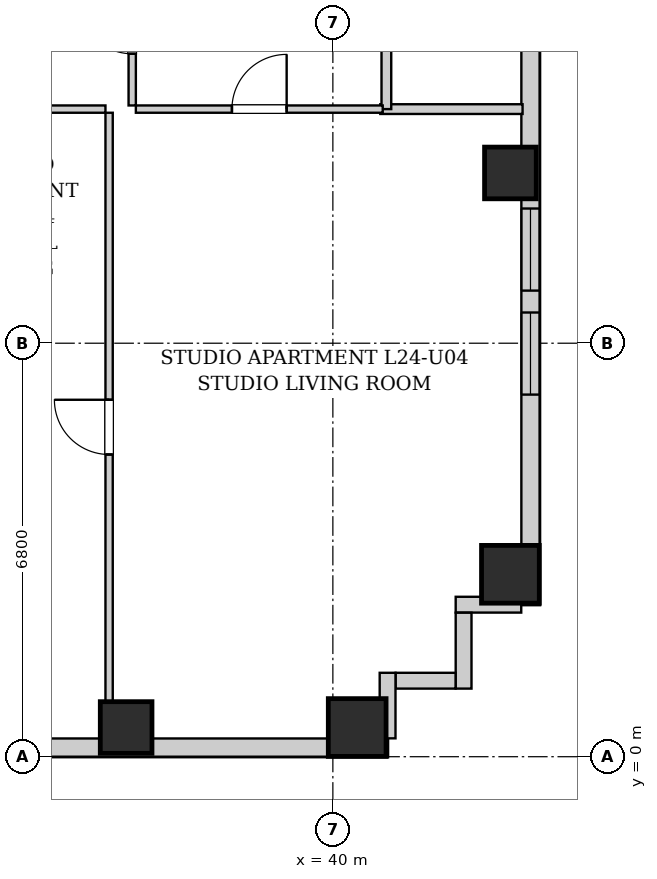
"""IFC4 building model, lengths in metres.
Left out: names, types, materials, properties, quantities, classifications, styles, units other than length and angle.
Written with IfcOpenShell. Run it as: python <this file> out.ifc"""

import sys

from ifc_helpers import new_model, si_unit, direction, frame, frame_2d, origin, origin_2d, place, context, subcontext, project, spatial, rectangle, extrude, element, fill, save


model = new_model("IFC4")
c1 = context("Model", 3, precision=1e-05, world=origin(), true_north=direction((0.0, 1.0)))
c2 = subcontext(c1, "Body", "Model", "MODEL_VIEW")
j1 = project(units=[si_unit("LENGTHUNIT", "METRE"), si_unit("PLANEANGLEUNIT", "RADIAN")], contexts=[c1])
p1 = place(None, origin())
s1 = spatial("IfcSite", under=j1, at=p1, CompositionType="ELEMENT")
p2 = place(p1, origin())
s2 = spatial("IfcBuilding", under=s1, at=p2, CompositionType="ELEMENT")
p3 = place(p2, frame((0.0, 0.0, 87.9)))
s3 = spatial("IfcBuildingStorey", under=s2, at=p3, CompositionType="ELEMENT", Elevation=87.9)
p4 = place(p3, frame((36.6, 0.48, 0.0), z_axis=(0.0, 0.0, 1.0), x_axis=(1.0, 0.0, 0.0)))
e1 = element("IfcColumn", 1, at=p4, inside=s3, PredefinedType="COLUMN", context=c2, shape_type="SweptSolid", body=[
    extrude(rectangle(XDim=0.85, YDim=0.85, at=origin_2d()), origin(), (0.0, 0.0, 1.0), 3.2),
])
for number, where, z_axis, x_axis in (
    (2, (40.4, 0.48, 0.0), (0.0, 0.0, 1.0), (1.0, 0.0, 0.0)),
    (3, (42.92, 3.0, 0.0), (0.0, 0.0, 1.0), (1.0, 0.0, 0.0)),
):
    element("IfcColumn", number, at=place(p3, frame(where, z_axis=z_axis, x_axis=x_axis)), inside=s3, PredefinedType="COLUMN", context=c2, shape_type="SweptSolid", body=[
        extrude(rectangle(XDim=0.95, YDim=0.95, at=origin_2d()), origin(), (0.0, 0.0, 1.0), 3.2),
    ])
p5 = place(p3, frame((42.92, 9.6, 0.0), z_axis=(0.0, 0.0, 1.0), x_axis=(1.0, 0.0, 0.0)))
e4 = element("IfcColumn", 4, at=p5, inside=s3, PredefinedType="COLUMN", context=c2, shape_type="SweptSolid", body=[
    extrude(rectangle(XDim=0.85, YDim=0.85, at=origin_2d()), origin(), (0.0, 0.0, 1.0), 3.2),
])
p6 = place(p3, frame((43.25, 40.8, 0.0), z_axis=(0.0, 0.0, 1.0), x_axis=(0.0, -1.0, 0.0)))
e5 = element("IfcWall", 5, at=p6, inside=s3, PredefinedType="SOLIDWALL", context=c2, shape_type="SweptSolid", body=[
    extrude(rectangle(XDim=38.3, YDim=0.3, at=frame_2d((19.15, 0.0))), origin(), (0.0, 0.0, 1.0), 2.94),
])
p7 = place(p6, frame((33.495, 0.0, 0.55)))
e6 = element("IfcOpeningElement", 6, at=p7, cuts=e5, PredefinedType="OPENING", context=c2, shape_type="SweptSolid", body=[
    extrude(rectangle(XDim=1.35, YDim=1.2, at=frame_2d((0.675, 0.6))), frame((0.0, 0.16, 0.0), z_axis=(0.0, -1.0, 0.0), x_axis=(1.0, 0.0, 0.0)), (0.0, 0.0, 1.0), 0.32),
])
p8 = place(p6, frame((31.785, 0.0, 0.55)))
e7 = element("IfcOpeningElement", 7, at=p8, cuts=e5, PredefinedType="OPENING", context=c2, shape_type="SweptSolid", body=[
    extrude(rectangle(XDim=1.35, YDim=1.2, at=frame_2d((0.675, 0.6))), frame((0.0, 0.16, 0.0), z_axis=(0.0, -1.0, 0.0), x_axis=(1.0, 0.0, 0.0)), (0.0, 0.0, 1.0), 0.32),
])
p9 = place(p6, frame((3.08, 0.0, 0.55)))
e8 = element("IfcOpeningElement", 8, at=p9, cuts=e5, PredefinedType="OPENING", context=c2, shape_type="SweptSolid", body=[
    extrude(rectangle(XDim=1.35, YDim=1.2, at=frame_2d((0.675, 0.6))), frame((0.0, 0.16, 0.0), z_axis=(0.0, -1.0, 0.0), x_axis=(1.0, 0.0, 0.0)), (0.0, 0.0, 1.0), 0.32),
])
p10 = place(p6, frame((1.135, 0.0, 0.55)))
e9 = element("IfcOpeningElement", 9, at=p10, cuts=e5, PredefinedType="OPENING", context=c2, shape_type="SweptSolid", body=[
    extrude(rectangle(XDim=1.35, YDim=1.2, at=frame_2d((0.675, 0.6))), frame((0.0, 0.16, 0.0), z_axis=(0.0, -1.0, 0.0), x_axis=(1.0, 0.0, 0.0)), (0.0, 0.0, 1.0), 0.32),
])
p11 = place(p6, frame((21.93, 0.0, 0.55)))
e10 = element("IfcOpeningElement", 10, at=p11, cuts=e5, PredefinedType="OPENING", context=c2, shape_type="SweptSolid", body=[
    extrude(rectangle(XDim=1.35, YDim=1.2, at=frame_2d((0.675, 0.6))), frame((0.0, 0.16, 0.0), z_axis=(0.0, -1.0, 0.0), x_axis=(1.0, 0.0, 0.0)), (0.0, 0.0, 1.0), 0.32),
])
p12 = place(p6, frame((23.54, 0.0, 0.55)))
e11 = element("IfcOpeningElement", 11, at=p12, cuts=e5, PredefinedType="OPENING", context=c2, shape_type="SweptSolid", body=[
    extrude(rectangle(XDim=1.35, YDim=1.2, at=frame_2d((0.675, 0.6))), frame((0.0, 0.16, 0.0), z_axis=(0.0, -1.0, 0.0), x_axis=(1.0, 0.0, 0.0)), (0.0, 0.0, 1.0), 0.32),
])
p13 = place(p6, frame((14.95, 0.0, 0.55)))
e12 = element("IfcOpeningElement", 12, at=p13, cuts=e5, PredefinedType="OPENING", context=c2, shape_type="SweptSolid", body=[
    extrude(rectangle(XDim=1.35, YDim=1.2, at=frame_2d((0.675, 0.6))), frame((0.0, 0.16, 0.0), z_axis=(0.0, -1.0, 0.0), x_axis=(1.0, 0.0, 0.0)), (0.0, 0.0, 1.0), 0.32),
])
p14 = place(p6, frame((12.385, 0.0, 0.55)))
e13 = element("IfcOpeningElement", 13, at=p14, cuts=e5, PredefinedType="OPENING", context=c2, shape_type="SweptSolid", body=[
    extrude(rectangle(XDim=1.35, YDim=1.2, at=frame_2d((0.675, 0.6))), frame((0.0, 0.16, 0.0), z_axis=(0.0, -1.0, 0.0), x_axis=(1.0, 0.0, 0.0)), (0.0, 0.0, 1.0), 0.32),
])
p15 = place(p3, frame((40.9, 0.15, 0.0), z_axis=(0.0, 0.0, 1.0), x_axis=(-1.0, 0.0, 0.0)))
e14 = element("IfcWall", 14, at=p15, inside=s3, PredefinedType="SOLIDWALL", context=c2, shape_type="SweptSolid", body=[
    extrude(rectangle(XDim=23.9, YDim=0.3, at=frame_2d((11.95, 0.0))), origin(), (0.0, 0.0, 1.0), 2.94),
])
p16 = place(p15, frame((21.045, 0.0, 0.55)))
e15 = element("IfcOpeningElement", 15, at=p16, cuts=e14, PredefinedType="OPENING", context=c2, shape_type="SweptSolid", body=[
    extrude(rectangle(XDim=1.35, YDim=1.2, at=frame_2d((0.675, 0.6))), frame((0.0, 0.16, 0.0), z_axis=(0.0, -1.0, 0.0), x_axis=(1.0, 0.0, 0.0)), (0.0, 0.0, 1.0), 0.32),
])
p17 = place(p15, frame((18.4, 0.0, 0.55)))
e16 = element("IfcOpeningElement", 16, at=p17, cuts=e14, PredefinedType="OPENING", context=c2, shape_type="SweptSolid", body=[
    extrude(rectangle(XDim=1.35, YDim=1.2, at=frame_2d((0.675, 0.6))), frame((0.0, 0.16, 0.0), z_axis=(0.0, -1.0, 0.0), x_axis=(1.0, 0.0, 0.0)), (0.0, 0.0, 1.0), 0.32),
])
p18 = place(p15, frame((12.05, 0.0, 0.55)))
e17 = element("IfcOpeningElement", 17, at=p18, cuts=e14, PredefinedType="OPENING", context=c2, shape_type="SweptSolid", body=[
    extrude(rectangle(XDim=1.35, YDim=1.2, at=frame_2d((0.675, 0.6))), frame((0.0, 0.16, 0.0), z_axis=(0.0, -1.0, 0.0), x_axis=(1.0, 0.0, 0.0)), (0.0, 0.0, 1.0), 0.32),
])
p19 = place(p15, frame((8.72, 0.0, 0.55)))
e18 = element("IfcOpeningElement", 18, at=p19, cuts=e14, PredefinedType="OPENING", context=c2, shape_type="SweptSolid", body=[
    extrude(rectangle(XDim=1.35, YDim=1.2, at=frame_2d((0.675, 0.6))), frame((0.0, 0.16, 0.0), z_axis=(0.0, -1.0, 0.0), x_axis=(1.0, 0.0, 0.0)), (0.0, 0.0, 1.0), 0.32),
])
p20 = place(p15, frame((5.563, 0.0, 0.55)))
e19 = element("IfcOpeningElement", 19, at=p20, cuts=e14, PredefinedType="OPENING", context=c2, shape_type="SweptSolid", body=[
    extrude(rectangle(XDim=1.35, YDim=1.2, at=frame_2d((0.675, 0.6))), frame((0.0, 0.16, 0.0), z_axis=(0.0, -1.0, 0.0), x_axis=(1.0, 0.0, 0.0)), (0.0, 0.0, 1.0), 0.32),
])
p21 = place(p3, frame((43.098, 2.5, 0.0), z_axis=(0.0, 0.0, 1.0), x_axis=(-1.0, 0.0, 0.0)))
e20 = element("IfcWall", 20, at=p21, inside=s3, PredefinedType="SOLIDWALL", context=c2, shape_type="SweptSolid", body=[
    extrude(rectangle(XDim=1.078, YDim=0.26, at=frame_2d((0.539, 0.0))), origin(), (0.0, 0.0, 1.0), 2.94),
])
p22 = place(p3, frame((42.15, 2.368, 0.0), z_axis=(0.0, 0.0, 1.0), x_axis=(0.0, -1.0, 0.0)))
e21 = element("IfcWall", 21, at=p22, inside=s3, PredefinedType="SOLIDWALL", context=c2, shape_type="SweptSolid", body=[
    extrude(rectangle(XDim=1.248, YDim=0.26, at=frame_2d((0.624, 0.0))), origin(), (0.0, 0.0, 1.0), 2.94),
])
p23 = place(p3, frame((42.018, 1.25, 0.0), z_axis=(0.0, 0.0, 1.0), x_axis=(-1.0, 0.0, 0.0)))
e22 = element("IfcWall", 22, at=p23, inside=s3, PredefinedType="SOLIDWALL", context=c2, shape_type="SweptSolid", body=[
    extrude(rectangle(XDim=0.986, YDim=0.26, at=frame_2d((0.493, 0.0))), origin(), (0.0, 0.0, 1.0), 2.94),
])
p24 = place(p3, frame((40.9, 1.38, 0.0), z_axis=(0.0, 0.0, 1.0), x_axis=(0.0, -1.0, 0.0)))
e23 = element("IfcWall", 23, at=p24, inside=s3, PredefinedType="SOLIDWALL", context=c2, shape_type="SweptSolid", body=[
    extrude(rectangle(XDim=1.078, YDim=0.26, at=frame_2d((0.539, 0.0))), origin(), (0.0, 0.0, 1.0), 2.94),
])
p25 = place(p3, frame((40.78, 10.65, 0.0), z_axis=(0.0, 0.0, 1.0), x_axis=(1.0, 0.0, 0.0)))
e24 = element("IfcWall", 24, at=p25, inside=s3, PredefinedType="PARTITIONING", context=c2, shape_type="SweptSolid", body=[
    extrude(rectangle(XDim=2.34, YDim=0.16, at=frame_2d((1.17, 0.0))), origin(), (0.0, 0.0, 1.0), 2.94),
])
p26 = place(p3, frame((40.88, 10.65, 0.0), z_axis=(0.0, 0.0, 1.0), x_axis=(0.0, 1.0, 0.0)))
e25 = element("IfcWall", 25, at=p26, inside=s3, PredefinedType="PARTITIONING", context=c2, shape_type="SweptSolid", body=[
    extrude(rectangle(XDim=2.66, YDim=0.16, at=frame_2d((1.33, 0.0))), origin(), (0.0, 0.0, 1.0), 2.94),
])
p27 = place(p3, frame((36.7, 10.71, 0.0), z_axis=(0.0, 0.0, 1.0), x_axis=(0.0, 1.0, 0.0)))
e26 = element("IfcWall", 26, at=p27, inside=s3, PredefinedType="PARTITIONING", context=c2, shape_type="SweptSolid", body=[
    extrude(rectangle(XDim=2.6, YDim=0.12, at=frame_2d((1.3, 0.0))), origin(), (0.0, 0.0, 1.0), 2.94),
])
p28 = place(p27, frame((0.85, 0.0, 0.0)))
e27 = element("IfcOpeningElement", 27, at=p28, cuts=e26, PredefinedType="OPENING", context=c2, shape_type="SweptSolid", body=[
    extrude(rectangle(XDim=0.9, YDim=2.05, at=frame_2d((0.45, 1.025))), frame((0.0, 0.07, 0.0), z_axis=(0.0, -1.0, 0.0), x_axis=(1.0, 0.0, 0.0)), (0.0, 0.0, 1.0), 0.14),
])
p29 = place(p3, frame((33.16, 10.65, 0.0), z_axis=(0.0, 0.0, 1.0), x_axis=(1.0, 0.0, 0.0)))
e28 = element("IfcWall", 28, at=p29, inside=s3, PredefinedType="PARTITIONING", context=c2, shape_type="SweptSolid", body=[
    extrude(rectangle(XDim=3.1, YDim=0.12, at=frame_2d((1.55, 0.0))), origin(), (0.0, 0.0, 1.0), 2.94),
])
p30 = place(p29, frame((1.1, 0.0, 0.0)))
e29 = element("IfcOpeningElement", 29, at=p30, cuts=e28, PredefinedType="OPENING", context=c2, shape_type="SweptSolid", body=[
    extrude(rectangle(XDim=0.9, YDim=2.05, at=frame_2d((0.45, 1.025))), frame((0.0, 0.07, 0.0), z_axis=(0.0, -1.0, 0.0), x_axis=(1.0, 0.0, 0.0)), (0.0, 0.0, 1.0), 0.14),
])
p31 = place(p3, frame((36.76, 10.65, 0.0), z_axis=(0.0, 0.0, 1.0), x_axis=(1.0, 0.0, 0.0)))
e30 = element("IfcWall", 30, at=p31, inside=s3, PredefinedType="PARTITIONING", context=c2, shape_type="SweptSolid", body=[
    extrude(rectangle(XDim=4.06, YDim=0.12, at=frame_2d((2.03, 0.0))), origin(), (0.0, 0.0, 1.0), 2.94),
])
p32 = place(p31, frame((1.58, 0.0, 0.0)))
e31 = element("IfcOpeningElement", 31, at=p32, cuts=e30, PredefinedType="OPENING", context=c2, shape_type="SweptSolid", body=[
    extrude(rectangle(XDim=0.9, YDim=2.05, at=frame_2d((0.45, 1.025))), frame((0.0, 0.07, 0.0), z_axis=(0.0, -1.0, 0.0), x_axis=(1.0, 0.0, 0.0)), (0.0, 0.0, 1.0), 0.14),
])
p33 = place(p3, frame((36.32, 0.28, 0.0), z_axis=(0.0, 0.0, 1.0), x_axis=(0.0, 1.0, 0.0)))
e32 = element("IfcWall", 32, at=p33, inside=s3, PredefinedType="PARTITIONING", context=c2, shape_type="SweptSolid", body=[
    extrude(rectangle(XDim=10.31, YDim=0.12, at=frame_2d((5.155, 0.0))), origin(), (0.0, 0.0, 1.0), 2.94),
])
p34 = place(p33, frame((4.69, 0.0, 0.0)))
e33 = element("IfcOpeningElement", 33, at=p34, cuts=e32, PredefinedType="OPENING", context=c2, shape_type="SweptSolid", body=[
    extrude(rectangle(XDim=0.9, YDim=2.05, at=frame_2d((0.45, 1.025))), frame((0.0, 0.07, 0.0), z_axis=(0.0, -1.0, 0.0), x_axis=(1.0, 0.0, 0.0)), (0.0, 0.0, 1.0), 0.14),
])
p35 = place(p28, origin())
e34 = element("IfcDoor", 34, at=p35, inside=s3, OperationType="SINGLE_SWING_RIGHT", PredefinedType="DOOR", context=c2, shape_type="SweptSolid", body=[
    extrude(rectangle(XDim=0.9, YDim=2.05, at=frame_2d((0.45, 1.025))), frame((0.0, 0.025, 0.0), z_axis=(0.0, -1.0, 0.0), x_axis=(1.0, 0.0, 0.0)), (0.0, 0.0, 1.0), 0.05),
])
fill(e27, e34)
p36 = place(p32, origin())
e35 = element("IfcDoor", 35, at=p36, inside=s3, OperationType="SINGLE_SWING_RIGHT", PredefinedType="DOOR", context=c2, shape_type="SweptSolid", body=[
    extrude(rectangle(XDim=0.9, YDim=2.05, at=frame_2d((0.45, 1.025))), frame((0.0, 0.025, 0.0), z_axis=(0.0, -1.0, 0.0), x_axis=(1.0, 0.0, 0.0)), (0.0, 0.0, 1.0), 0.05),
])
fill(e31, e35)
p37 = place(p34, origin())
e36 = element("IfcDoor", 36, at=p37, inside=s3, OperationType="SINGLE_SWING_RIGHT", PredefinedType="DOOR", context=c2, shape_type="SweptSolid", body=[
    extrude(rectangle(XDim=0.9, YDim=2.05, at=frame_2d((0.45, 1.025))), frame((0.0, 0.025, 0.0), z_axis=(0.0, -1.0, 0.0), x_axis=(1.0, 0.0, 0.0)), (0.0, 0.0, 1.0), 0.05),
])
fill(e33, e36)
p38 = place(p7, origin())
e37 = element("IfcWindow", 37, at=p38, inside=s3, PartitioningType="SINGLE_PANEL", PredefinedType="WINDOW", context=c2, shape_type="SweptSolid", body=[
    extrude(rectangle(XDim=1.35, YDim=1.2, at=frame_2d((0.675, 0.6))), frame((0.0, 0.03, 0.0), z_axis=(0.0, -1.0, 0.0), x_axis=(1.0, 0.0, 0.0)), (0.0, 0.0, 1.0), 0.06),
])
fill(e6, e37)
p39 = place(p8, origin())
e38 = element("IfcWindow", 38, at=p39, inside=s3, PartitioningType="SINGLE_PANEL", PredefinedType="WINDOW", context=c2, shape_type="SweptSolid", body=[
    extrude(rectangle(XDim=1.35, YDim=1.2, at=frame_2d((0.675, 0.6))), frame((0.0, 0.03, 0.0), z_axis=(0.0, -1.0, 0.0), x_axis=(1.0, 0.0, 0.0)), (0.0, 0.0, 1.0), 0.06),
])
fill(e7, e38)
save(model, sys.argv[1])
